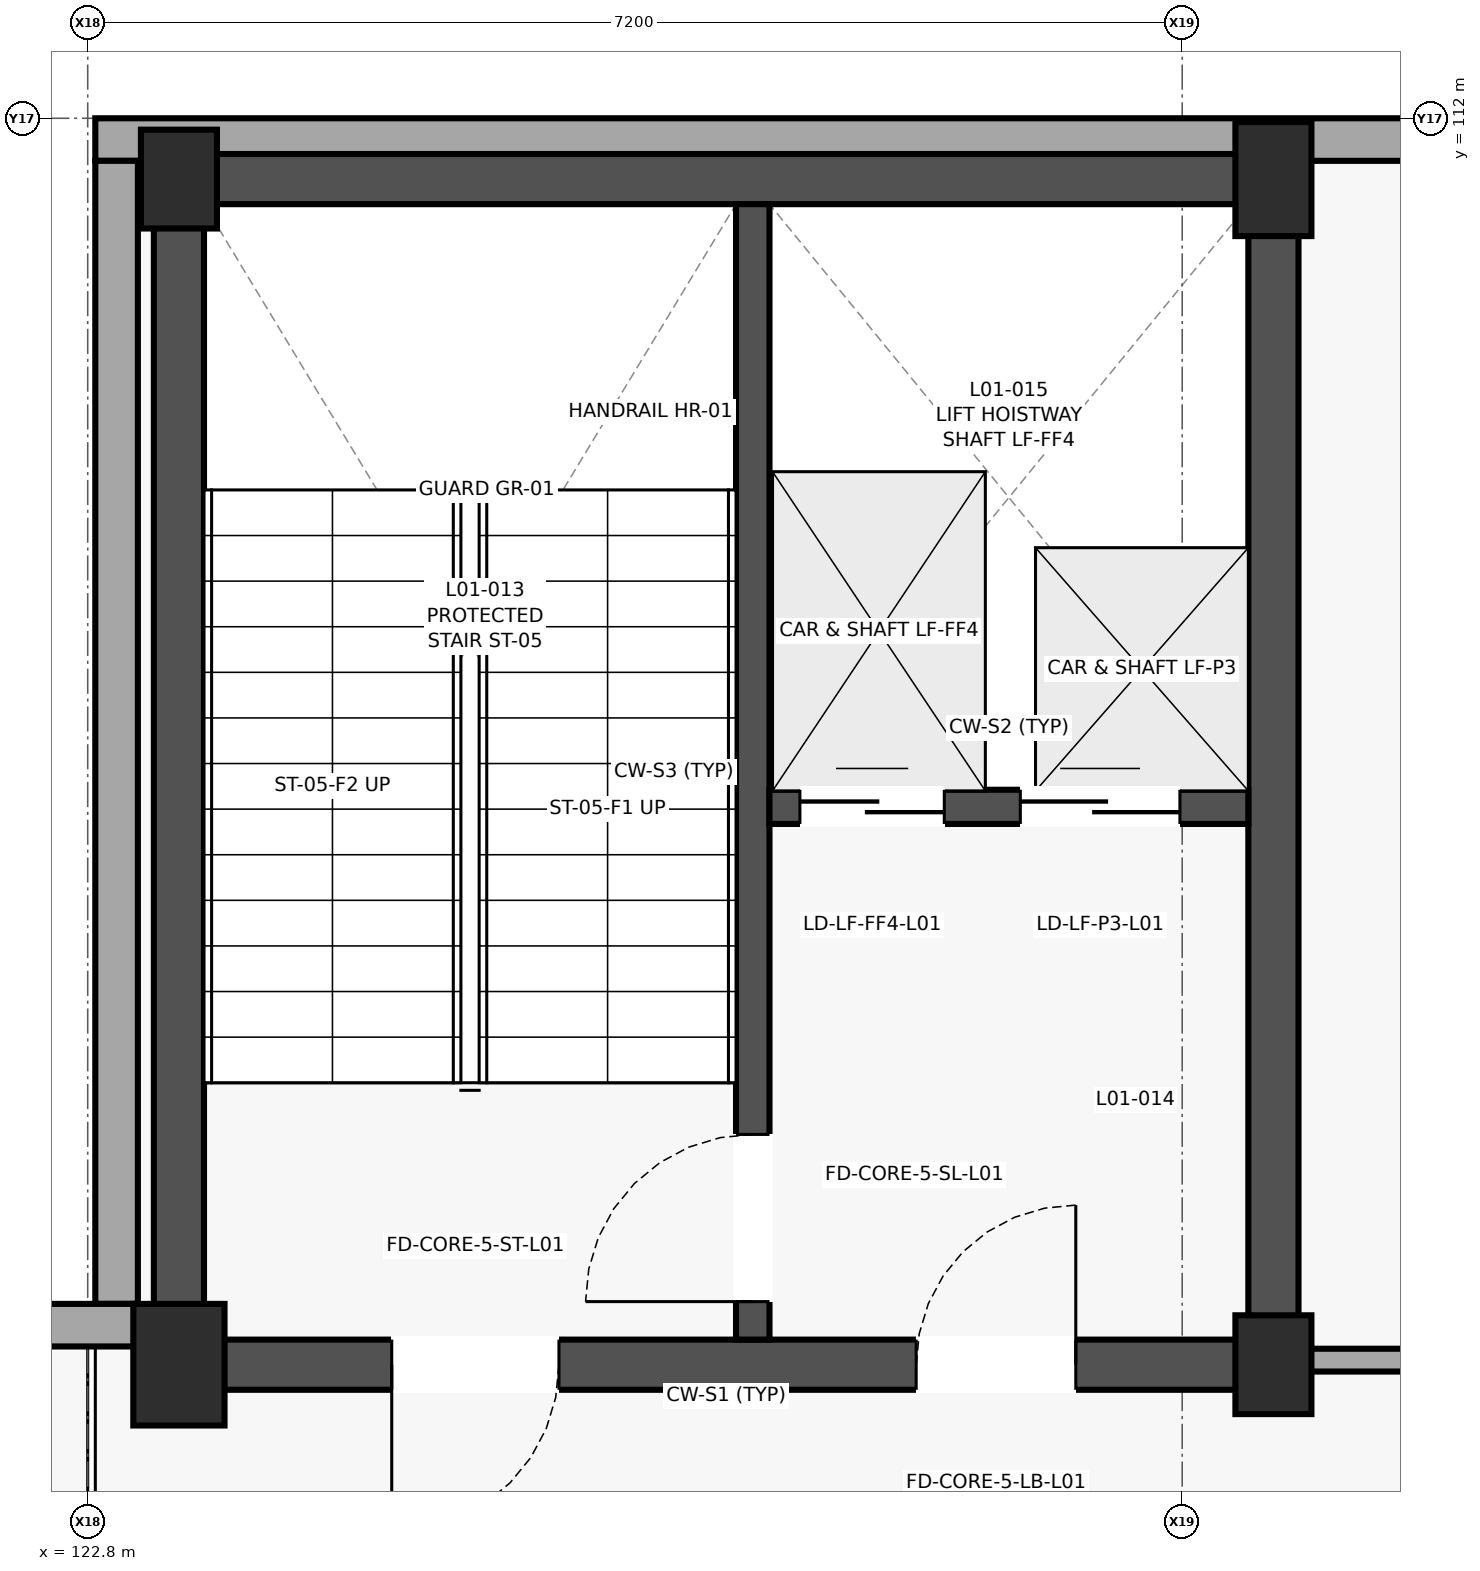
"""IFC4 building model, lengths in metres.
Left out: names, types, materials, properties, quantities, classifications, styles, units other than length and angle.
Written with IfcOpenShell. Run it as: python <this file> out.ifc"""

import sys

from ifc_helpers import new_model, si_unit, direction, frame, frame_2d, origin, origin_2d, place, context, subcontext, project, spatial, rectangle, extrude, element, fill, save


model = new_model("IFC4")
c1 = context("Model", 3, precision=1e-05, world=origin(), true_north=direction((0.0, 1.0)))
c2 = subcontext(c1, "Body", "Model", "MODEL_VIEW")
j1 = project(units=[si_unit("LENGTHUNIT", "METRE"), si_unit("PLANEANGLEUNIT", "RADIAN")], contexts=[c1])
p1 = place(None, origin())
s1 = spatial("IfcSite", under=j1, at=p1, CompositionType="ELEMENT")
p2 = place(p1, origin())
s2 = spatial("IfcBuilding", under=s1, at=p2, CompositionType="ELEMENT")
p3 = place(p2, frame((0.0, 0.0, 4.2)))
s3 = spatial("IfcBuildingStorey", under=s2, at=p3, CompositionType="ELEMENT", Elevation=4.2)
p4 = place(p3, frame((123.4, 103.8, 0.0), z_axis=(0.0, 0.0, 1.0), x_axis=(1.0, 0.0, 0.0)))
e1 = element("IfcColumn", 1, at=p4, inside=s3, PredefinedType="COLUMN", context=c2, shape_type="SweptSolid", body=[
    extrude(rectangle(XDim=0.6, YDim=0.8, at=origin_2d()), origin(), (0.0, 0.0, 1.0), 4.0),
])
for number, where, z_axis, x_axis in (
    (2, (123.4, 111.6, 0.0), (0.0, 0.0, 1.0), (1.0, 0.0, 0.0)),
    (3, (130.6, 103.8, 0.0), (0.0, 0.0, 1.0), (1.0, 0.0, 0.0)),
):
    element("IfcColumn", number, at=place(p3, frame(where, z_axis=z_axis, x_axis=x_axis)), inside=s3, PredefinedType="COLUMN", context=c2, shape_type="SweptSolid", body=[
        extrude(rectangle(XDim=0.5, YDim=0.65, at=origin_2d()), origin(), (0.0, 0.0, 1.0), 4.0),
    ])
p5 = place(p3, frame((130.6, 111.6, 0.0), z_axis=(0.0, 0.0, 1.0), x_axis=(1.0, 0.0, 0.0)))
e4 = element("IfcColumn", 4, at=p5, inside=s3, PredefinedType="COLUMN", context=c2, shape_type="SweptSolid", body=[
    extrude(rectangle(XDim=0.5, YDim=0.75, at=origin_2d()), origin(), (0.0, 0.0, 1.0), 4.0),
])
p6 = place(p3, frame((138.641, 111.86, 0.0), z_axis=(0.0, 0.0, 1.0), x_axis=(-1.0, 0.0, 0.0)))
e5 = element("IfcWall", 5, at=p6, inside=s3, PredefinedType="SOLIDWALL", context=c2, shape_type="SweptSolid", body=[
    extrude(rectangle(XDim=15.791, YDim=0.28, at=frame_2d((7.896, 0.0))), origin(), (0.0, 0.0, 1.0), 3.015),
])
p7 = place(p6, frame((2.174, 0.0, 1.05)))
e6 = element("IfcOpeningElement", 6, at=p7, cuts=e5, PredefinedType="OPENING", context=c2, shape_type="SweptSolid", body=[
    extrude(rectangle(XDim=1.3, YDim=1.6, at=frame_2d((0.65, 0.8))), frame((0.0, 0.15, 0.0), z_axis=(0.0, -1.0, 0.0), x_axis=(1.0, 0.0, 0.0)), (0.0, 0.0, 1.0), 0.3),
])
p8 = place(p6, frame((5.197, 0.0, 0.85)))
e7 = element("IfcOpeningElement", 7, at=p8, cuts=e5, PredefinedType="OPENING", context=c2, shape_type="SweptSolid", body=[
    extrude(rectangle(XDim=1.45, YDim=1.7, at=frame_2d((0.725, 0.85))), frame((0.0, 0.15, 0.0), z_axis=(0.0, -1.0, 0.0), x_axis=(1.0, 0.0, 0.0)), (0.0, 0.0, 1.0), 0.3),
])
p9 = place(p3, frame((122.99, 111.72, 0.0), z_axis=(0.0, 0.0, 1.0), x_axis=(0.0, -1.0, 0.0)))
e8 = element("IfcWall", 8, at=p9, inside=s3, PredefinedType="SOLIDWALL", context=c2, shape_type="SweptSolid", body=[
    extrude(rectangle(XDim=7.52, YDim=0.28, at=frame_2d((3.76, 0.0))), origin(), (0.0, 0.0, 1.0), 3.78),
])
p10 = place(p3, frame((123.13, 104.06, 0.0), z_axis=(0.0, 0.0, 1.0), x_axis=(-1.0, 0.0, 0.0)))
e9 = element("IfcWall", 9, at=p10, inside=s3, PredefinedType="SOLIDWALL", context=c2, shape_type="SweptSolid", body=[
    extrude(rectangle(XDim=7.53, YDim=0.28, at=frame_2d((3.765, 0.0))), origin(), (0.0, 0.0, 1.0), 3.78),
])
p11 = place(p10, frame((1.308, 0.0, 1.05)))
e10 = element("IfcOpeningElement", 10, at=p11, cuts=e9, PredefinedType="OPENING", context=c2, shape_type="SweptSolid", body=[
    extrude(rectangle(XDim=1.15, YDim=1.4, at=frame_2d((0.575, 0.7))), frame((0.0, 0.15, 0.0), z_axis=(0.0, -1.0, 0.0), x_axis=(1.0, 0.0, 0.0)), (0.0, 0.0, 1.0), 0.3),
])
p12 = place(p10, frame((5.123, 0.0, 1.05)))
e11 = element("IfcOpeningElement", 11, at=p12, cuts=e9, PredefinedType="OPENING", context=c2, shape_type="SweptSolid", body=[
    extrude(rectangle(XDim=1.05, YDim=1.3, at=frame_2d((0.525, 0.65))), frame((0.0, 0.15, 0.0), z_axis=(0.0, -1.0, 0.0), x_axis=(1.0, 0.0, 0.0)), (0.0, 0.0, 1.0), 0.3),
])
p13 = place(p3, frame((123.235, 103.8, 0.0), z_axis=(0.0, 0.0, 1.0), x_axis=(1.0, 0.0, 0.0)))
e12 = element("IfcWall", 12, at=p13, inside=s3, PredefinedType="SHEAR", context=c2, shape_type="SweptSolid", body=[
    extrude(rectangle(XDim=7.53, YDim=0.33, at=frame_2d((3.765, 0.0))), origin(), (0.0, 0.0, 1.0), 3.78),
])
p14 = place(p13, frame((5.015, 0.0, 0.0)))
e13 = element("IfcOpeningElement", 13, at=p14, cuts=e12, PredefinedType="OPENING", context=c2, shape_type="SweptSolid", body=[
    extrude(rectangle(XDim=1.05, YDim=2.15, at=frame_2d((0.525, 1.075))), frame((0.0, 0.175, 0.0), z_axis=(0.0, -1.0, 0.0), x_axis=(1.0, 0.0, 0.0)), (0.0, 0.0, 1.0), 0.35),
])
p15 = place(p13, frame((1.565, 0.0, 0.0)))
e14 = element("IfcOpeningElement", 14, at=p15, cuts=e12, PredefinedType="OPENING", context=c2, shape_type="SweptSolid", body=[
    extrude(rectangle(XDim=1.1, YDim=2.15, at=frame_2d((0.55, 1.075))), frame((0.0, 0.175, 0.0), z_axis=(0.0, -1.0, 0.0), x_axis=(1.0, 0.0, 0.0)), (0.0, 0.0, 1.0), 0.35),
])
p16 = place(p3, frame((123.235, 111.6, 0.0), z_axis=(0.0, 0.0, 1.0), x_axis=(1.0, 0.0, 0.0)))
e15 = element("IfcWall", 15, at=p16, inside=s3, PredefinedType="SHEAR", context=c2, shape_type="SweptSolid", body=[
    extrude(rectangle(XDim=7.53, YDim=0.33, at=frame_2d((3.765, 0.0))), origin(), (0.0, 0.0, 1.0), 3.78),
])
for number, where, z_axis, x_axis in (
    (16, (123.4, 103.965, 0.0), (0.0, 0.0, 1.0), (0.0, 1.0, 0.0)),
    (17, (130.6, 103.965, 0.0), (0.0, 0.0, 1.0), (0.0, 1.0, 0.0)),
):
    element("IfcWall", number, at=place(p3, frame(where, z_axis=z_axis, x_axis=x_axis)), inside=s3, PredefinedType="SHEAR", context=c2, shape_type="SweptSolid", body=[
        extrude(rectangle(XDim=7.47, YDim=0.33, at=frame_2d((3.735, 0.0))), origin(), (0.0, 0.0, 1.0), 3.78),
    ])
p17 = place(p3, frame((127.175, 103.965, 0.0), z_axis=(0.0, 0.0, 1.0), x_axis=(0.0, 1.0, 0.0)))
e18 = element("IfcWall", 18, at=p17, inside=s3, PredefinedType="SHEAR", context=c2, shape_type="SweptSolid", body=[
    extrude(rectangle(XDim=7.47, YDim=0.22, at=frame_2d((3.735, 0.0))), origin(), (0.0, 0.0, 1.0), 3.78),
])
p18 = place(p17, frame((0.25, 0.0, 0.0)))
e19 = element("IfcOpeningElement", 19, at=p18, cuts=e18, PredefinedType="OPENING", context=c2, shape_type="SweptSolid", body=[
    extrude(rectangle(XDim=1.1, YDim=2.15, at=frame_2d((0.55, 1.075))), frame((0.0, 0.12, 0.0), z_axis=(0.0, -1.0, 0.0), x_axis=(1.0, 0.0, 0.0)), (0.0, 0.0, 1.0), 0.24),
])
p19 = place(p3, frame((127.285, 107.47, 0.0), z_axis=(0.0, 0.0, 1.0), x_axis=(1.0, 0.0, 0.0)))
e20 = element("IfcWall", 20, at=p19, inside=s3, PredefinedType="SHEAR", context=c2, shape_type="SweptSolid", body=[
    extrude(rectangle(XDim=3.15, YDim=0.225, at=frame_2d((1.575, 0.0))), origin(), (0.0, 0.0, 1.0), 3.78),
])
p20 = place(p19, frame((0.2, 0.0, 0.0)))
e21 = element("IfcOpeningElement", 21, at=p20, cuts=e20, PredefinedType="OPENING", context=c2, shape_type="SweptSolid", body=[
    extrude(rectangle(XDim=0.95, YDim=2.15, at=frame_2d((0.475, 1.075))), frame((0.0, 0.123, 0.0), z_axis=(0.0, -1.0, 0.0), x_axis=(1.0, 0.0, 0.0)), (0.0, 0.0, 1.0), 0.245),
])
p21 = place(p19, frame((1.65, 0.0, 0.0)))
e22 = element("IfcOpeningElement", 22, at=p21, cuts=e20, PredefinedType="OPENING", context=c2, shape_type="SweptSolid", body=[
    extrude(rectangle(XDim=1.05, YDim=2.2, at=frame_2d((0.525, 1.1))), frame((0.0, 0.123, 0.0), z_axis=(0.0, -1.0, 0.0), x_axis=(1.0, 0.0, 0.0)), (0.0, 0.0, 1.0), 0.245),
])
p22 = place(p3, frame((130.83, 103.83, 0.0), z_axis=(0.0, 0.0, 1.0), x_axis=(1.0, 0.0, 0.0)))
e23 = element("IfcWall", 23, at=p22, inside=s3, PredefinedType="PARTITIONING", context=c2, shape_type="SweptSolid", body=[
    extrude(rectangle(XDim=27.692, YDim=0.15, at=frame_2d((13.846, 0.0))), origin(), (0.0, 0.0, 1.0), 3.715),
])
p23 = place(p22, frame((13.271, 0.0, 0.0)))
e24 = element("IfcOpeningElement", 24, at=p23, cuts=e23, PredefinedType="OPENING", context=c2, shape_type="SweptSolid", body=[
    extrude(rectangle(XDim=1.15, YDim=2.2, at=frame_2d((0.575, 1.1))), frame((0.0, 0.085, 0.0), z_axis=(0.0, -1.0, 0.0), x_axis=(1.0, 0.0, 0.0)), (0.0, 0.0, 1.0), 0.17),
])
p24 = place(p20, origin())
e25 = element("IfcDoor", 25, at=p24, inside=s3, OperationType="SLIDING_TO_LEFT", PredefinedType="DOOR", context=c2, shape_type="SweptSolid", body=[
    extrude(rectangle(XDim=0.95, YDim=2.15, at=frame_2d((0.475, 1.075))), frame((0.0, 0.025, 0.0), z_axis=(0.0, -1.0, 0.0), x_axis=(1.0, 0.0, 0.0)), (0.0, 0.0, 1.0), 0.05),
])
fill(e21, e25)
p25 = place(p21, origin())
e26 = element("IfcDoor", 26, at=p25, inside=s3, OperationType="SLIDING_TO_RIGHT", PredefinedType="DOOR", context=c2, shape_type="SweptSolid", body=[
    extrude(rectangle(XDim=1.05, YDim=2.2, at=frame_2d((0.525, 1.1))), frame((0.0, 0.025, 0.0), z_axis=(0.0, -1.0, 0.0), x_axis=(1.0, 0.0, 0.0)), (0.0, 0.0, 1.0), 0.05),
])
fill(e22, e26)
p26 = place(p18, origin())
e27 = element("IfcDoor", 27, at=p26, inside=s3, OperationType="SINGLE_SWING_LEFT", PredefinedType="DOOR", context=c2, shape_type="SweptSolid", body=[
    extrude(rectangle(XDim=1.1, YDim=2.15, at=frame_2d((0.55, 1.075))), frame((0.0, 0.025, 0.0), z_axis=(0.0, -1.0, 0.0), x_axis=(1.0, 0.0, 0.0)), (0.0, 0.0, 1.0), 0.05),
])
fill(e19, e27)
p27 = place(p14, origin())
e28 = element("IfcDoor", 28, at=p27, inside=s3, OperationType="SINGLE_SWING_RIGHT", PredefinedType="DOOR", context=c2, shape_type="SweptSolid", body=[
    extrude(rectangle(XDim=1.05, YDim=2.15, at=frame_2d((0.525, 1.075))), frame((0.0, 0.025, 0.0), z_axis=(0.0, -1.0, 0.0), x_axis=(1.0, 0.0, 0.0)), (0.0, 0.0, 1.0), 0.05),
])
fill(e13, e28)
p28 = place(p15, frame((1.1, 0.0, 0.0), z_axis=(0.0, 0.0, 1.0), x_axis=(-1.0, 0.0, 0.0)))
e29 = element("IfcDoor", 29, at=p28, inside=s3, OperationType="SINGLE_SWING_LEFT", PredefinedType="DOOR", context=c2, shape_type="SweptSolid", body=[
    extrude(rectangle(XDim=1.1, YDim=2.15, at=frame_2d((0.55, 1.075))), frame((0.0, 0.025, 0.0), z_axis=(0.0, -1.0, 0.0), x_axis=(1.0, 0.0, 0.0)), (0.0, 0.0, 1.0), 0.05),
])
fill(e14, e29)
save(model, sys.argv[1])
